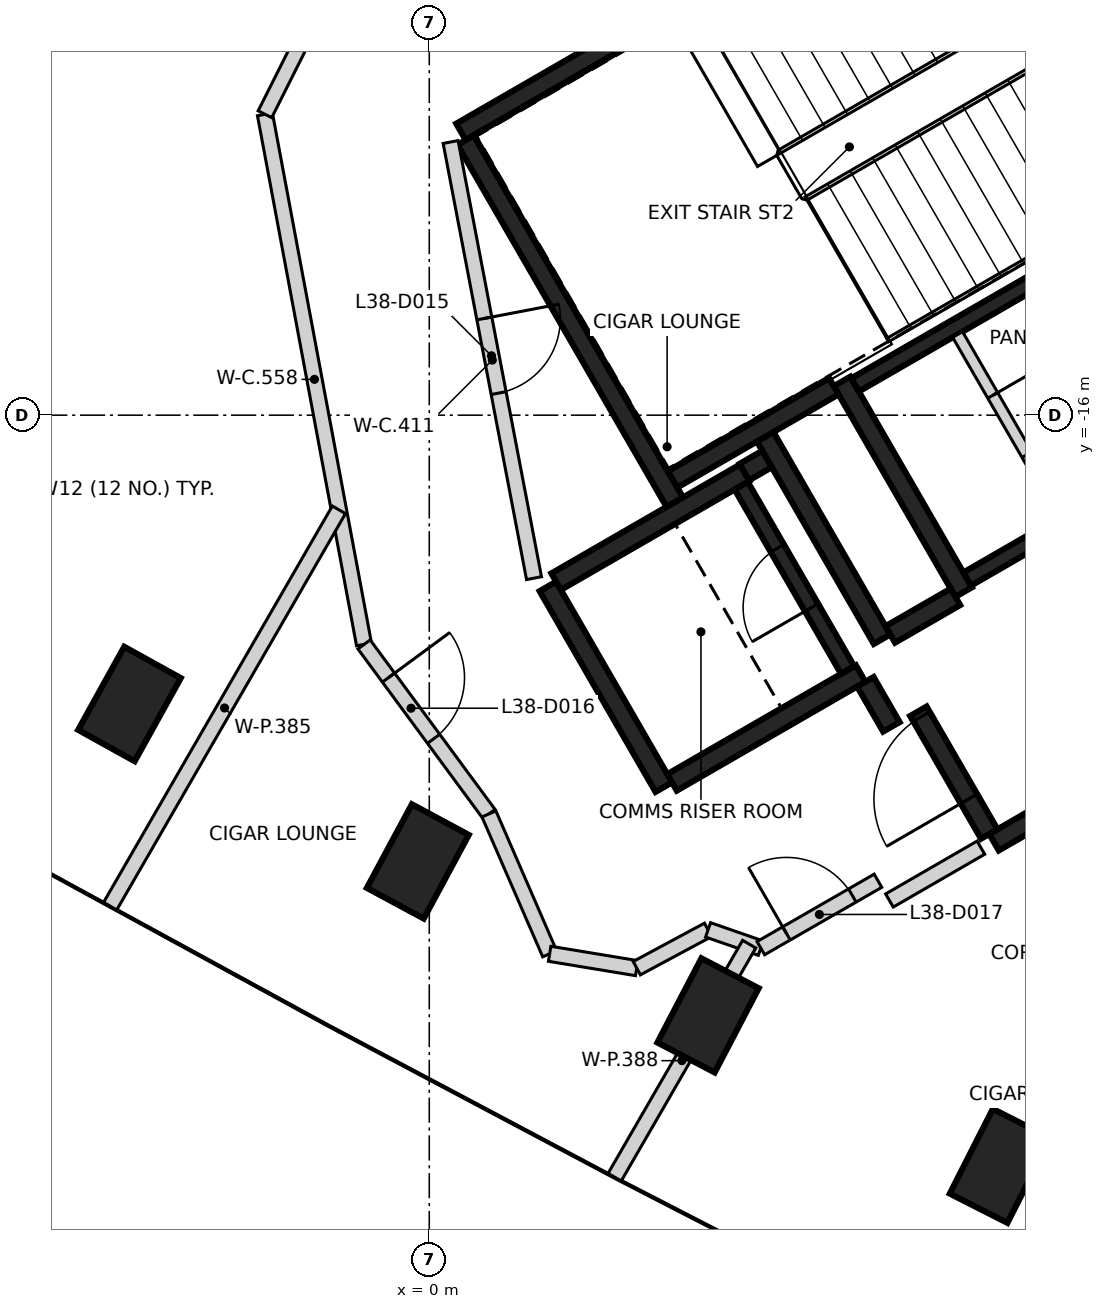
"""IFC4 building model, lengths in metres.
Left out: names, types, materials, properties, quantities, classifications, styles, units other than length and angle.
Written with IfcOpenShell. Run it as: python <this file> out.ifc"""

import sys

from ifc_helpers import new_model, si_unit, direction, frame, frame_2d, origin, origin_2d, place, context, subcontext, project, spatial, rectangle, extrude, element, fill, save


model = new_model("IFC4")
c1 = context("Model", 3, precision=1e-05, world=origin(), true_north=direction((0.0, 1.0)))
c2 = subcontext(c1, "Body", "Model", "MODEL_VIEW")
j1 = project(units=[si_unit("LENGTHUNIT", "METRE"), si_unit("PLANEANGLEUNIT", "RADIAN")], contexts=[c1])
p1 = place(None, origin())
s1 = spatial("IfcSite", under=j1, at=p1, CompositionType="ELEMENT")
p2 = place(p1, origin())
s2 = spatial("IfcBuilding", under=s1, at=p2, CompositionType="ELEMENT")
p3 = place(p2, frame((0.0, 0.0, 154.0)))
s3 = spatial("IfcBuildingStorey", under=s2, at=p3, CompositionType="ELEMENT", Elevation=154.0)
for number, where, z_axis, x_axis in (
    (1, (-3.945, -19.8, -0.4), (0.0, 0.0, 1.0), (0.485, 0.875, 0.0)),
    (2, (-0.151, -21.871, -0.4), (0.0, 0.0, 1.0), (0.474, 0.881, 0.0)),
    (3, (3.667, -23.896, -0.4), (0.0, 0.0, 1.0), (0.463, 0.886, 0.0)),
    (4, (7.51, -25.876, -0.4), (0.0, 0.0, 1.0), (0.453, 0.892, 0.0)),
):
    element("IfcColumn", number, at=place(p3, frame(where, z_axis=z_axis, x_axis=x_axis)), inside=s3, PredefinedType="COLUMN", context=c2, shape_type="SweptSolid", body=[
        extrude(rectangle(XDim=1.25, YDim=0.85, at=origin_2d()), origin(), (0.0, 0.0, 1.0), 3.6),
    ])
p4 = place(p3, frame((0.417, -12.273, 0.0), z_axis=(0.0, 0.0, 1.0), x_axis=(0.866021906294, 0.500006057782, 0.0)))
e5 = element("IfcWall", 5, at=p4, inside=s3, PredefinedType="SHEAR", context=c2, shape_type="SweptSolid", body=[
    extrude(rectangle(XDim=11.55, YDim=0.25, at=frame_2d((5.775, 0.0))), origin(), (0.0, 0.0, 1.0), 3.2),
])
p5 = place(p4, frame((10.025, 0.0, 0.0)))
e6 = element("IfcOpeningElement", 6, at=p5, cuts=e5, PredefinedType="OPENING", context=c2, shape_type="SweptSolid", body=[
    extrude(rectangle(XDim=1.2, YDim=2.1, at=frame_2d((0.6, 1.05))), frame((0.0, 0.135, 0.0), z_axis=(0.0, -1.0, 0.0), x_axis=(1.0, 0.0, 0.0)), (0.0, 0.0, 1.0), 0.27),
])
p6 = place(p4, frame((8.725, 0.0, 0.0)))
e7 = element("IfcOpeningElement", 7, at=p6, cuts=e5, PredefinedType="OPENING", context=c2, shape_type="SweptSolid", body=[
    extrude(rectangle(XDim=1.2, YDim=2.1, at=frame_2d((0.6, 1.05))), frame((0.0, 0.135, 0.0), z_axis=(0.0, -1.0, 0.0), x_axis=(1.0, 0.0, 0.0)), (0.0, 0.0, 1.0), 0.27),
])
p7 = place(p3, frame((3.235, -17.153, 0.0), z_axis=(0.0, 0.0, 1.0), x_axis=(-0.500008851346, 0.866020293397, 0.0)))
e8 = element("IfcWall", 8, at=p7, inside=s3, PredefinedType="SHEAR", context=c2, shape_type="SweptSolid", body=[
    extrude(rectangle(XDim=5.51, YDim=0.25, at=frame_2d((2.755, 0.0))), origin(), (0.0, 0.0, 1.0), 3.2),
])
p8 = place(p3, frame((7.031, -18.327, 0.0), z_axis=(0.0, 0.0, 1.0), x_axis=(-0.499971222258, 0.866042017984, 0.0)))
e9 = element("IfcWall", 9, at=p8, inside=s3, PredefinedType="SHEAR", context=c2, shape_type="SweptSolid", body=[
    extrude(rectangle(XDim=3.2, YDim=0.25, at=frame_2d((1.6, 0.0))), origin(), (0.0, 0.0, 1.0), 3.2),
])
p9 = place(p3, frame((3.085, -20.894, 0.0), z_axis=(0.0, 0.0, 1.0), x_axis=(-0.499978833458, 0.866037623948, 0.0)))
e10 = element("IfcWall", 10, at=p9, inside=s3, PredefinedType="SHEAR", context=c2, shape_type="SweptSolid", body=[
    extrude(rectangle(XDim=3.05, YDim=0.25, at=frame_2d((1.525, 0.0))), origin(), (0.0, 0.0, 1.0), 3.2),
])
p10 = place(p3, frame((1.669, -18.19, 0.0), z_axis=(0.0, 0.0, 1.0), x_axis=(0.866042235819, 0.499970844928, 0.0)))
e11 = element("IfcWall", 11, at=p10, inside=s3, PredefinedType="SHEAR", context=c2, shape_type="SweptSolid", body=[
    extrude(rectangle(XDim=2.865, YDim=0.25, at=frame_2d((1.432, 0.0))), origin(), (0.0, 0.0, 1.0), 3.2),
])
p11 = place(p3, frame((5.675, -19.399, 0.0), z_axis=(0.0, 0.0, 1.0), x_axis=(-0.866026637627, -0.499997862916, 0.0)))
e12 = element("IfcWall", 12, at=p11, inside=s3, PredefinedType="SHEAR", context=c2, shape_type="SweptSolid", body=[
    extrude(rectangle(XDim=2.865, YDim=0.25, at=frame_2d((1.432, 0.0))), origin(), (0.0, 0.0, 1.0), 3.2),
])
p12 = place(p3, frame((4.414, -16.276, 0.0), z_axis=(0.0, 0.0, 1.0), x_axis=(0.500003324108, -0.866023484601, 0.0)))
e13 = element("IfcWall", 13, at=p12, inside=s3, PredefinedType="SHEAR", context=c2, shape_type="SweptSolid", body=[
    extrude(rectangle(XDim=3.085, YDim=0.25, at=frame_2d((1.542, 0.0))), origin(), (0.0, 0.0, 1.0), 3.2),
])
p13 = place(p3, frame((5.322, -15.619, 0.0), z_axis=(0.0, 0.0, 1.0), x_axis=(-0.866026229868, -0.499998569178, 0.0)))
e14 = element("IfcWall", 14, at=p13, inside=s3, PredefinedType="SHEAR", context=c2, shape_type="SweptSolid", body=[
    extrude(rectangle(XDim=2.449, YDim=0.25, at=frame_2d((1.225, 0.0))), origin(), (0.0, 0.0, 1.0), 3.2),
])
p14 = place(p3, frame((9.14, -20.631, 0.0), z_axis=(0.0, 0.0, 1.0), x_axis=(-0.866043531843, -0.499968599967, 0.0)))
e15 = element("IfcWall", 15, at=p14, inside=s3, PredefinedType="SHEAR", context=c2, shape_type="SweptSolid", body=[
    extrude(rectangle(XDim=1.975, YDim=0.25, at=frame_2d((0.987, 0.0))), origin(), (0.0, 0.0, 1.0), 3.2),
])
p15 = place(p3, frame((7.367, -21.51, 0.0), z_axis=(0.0, 0.0, 1.0), x_axis=(-0.499983108224, 0.866035156036, 0.0)))
e16 = element("IfcWall", 16, at=p15, inside=s3, PredefinedType="SHEAR", context=c2, shape_type="SweptSolid", body=[
    extrude(rectangle(XDim=1.865, YDim=0.25, at=frame_2d((0.932, 0.0))), origin(), (0.0, 0.0, 1.0), 3.2),
])
p16 = place(p15, frame((0.535, 0.0, 0.0)))
e17 = element("IfcOpeningElement", 17, at=p16, cuts=e16, PredefinedType="OPENING", context=c2, shape_type="SweptSolid", body=[
    extrude(rectangle(XDim=1.25, YDim=2.1, at=frame_2d((0.625, 1.05))), frame((0.0, 0.135, 0.0), z_axis=(0.0, -1.0, 0.0), x_axis=(1.0, 0.0, 0.0)), (0.0, 0.0, 1.0), 0.27),
])
p17 = place(p3, frame((6.065, -18.885, 0.0), z_axis=(0.0, 0.0, 1.0), x_axis=(0.866017078145, 0.500014420154, 0.0)))
e18 = element("IfcWall", 18, at=p17, inside=s3, PredefinedType="SHEAR", context=c2, shape_type="SweptSolid", body=[
    extrude(rectangle(XDim=0.989, YDim=0.25, at=frame_2d((0.495, 0.0))), origin(), (0.0, 0.0, 1.0), 3.2),
])
p18 = place(p3, frame((6.08, -20.1, 0.0), z_axis=(0.0, 0.0, 1.0), x_axis=(-0.500051773299, 0.865995510393, 0.0)))
e19 = element("IfcWall", 19, at=p18, inside=s3, PredefinedType="SHEAR", context=c2, shape_type="SweptSolid", body=[
    extrude(rectangle(XDim=0.685, YDim=0.25, at=frame_2d((0.342, 0.0))), origin(), (0.0, 0.0, 1.0), 3.2),
])
p19 = place(p3, frame((4.145, -16.749, 0.0), z_axis=(0.0, 0.0, 1.0), x_axis=(0.866185586049, 0.49972245349, 0.0)))
e20 = element("IfcWall", 20, at=p19, inside=s3, PredefinedType="SHEAR", context=c2, shape_type="SweptSolid", body=[
    extrude(rectangle(XDim=0.344, YDim=0.25, at=frame_2d((0.172, 0.0))), origin(), (0.0, 0.0, 1.0), 3.2),
])
p20 = place(p3, frame((10.538, -12.752, 0.0), z_axis=(0.0, 0.0, 1.0), x_axis=(-0.866038630372, -0.499977090179, 0.0)))
e21 = element("IfcWall", 21, at=p20, inside=s3, PredefinedType="SHEAR", context=c2, shape_type="SweptSolid", body=[
    extrude(rectangle(XDim=5.699, YDim=0.2, at=frame_2d((2.85, 0.0))), origin(), (0.0, 0.0, 1.0), 3.2),
])
p21 = place(p3, frame((7.077, -18.156, 0.0), z_axis=(0.0, 0.0, 1.0), x_axis=(0.866038630372, 0.499977090179, 0.0)))
e22 = element("IfcWall", 22, at=p21, inside=s3, PredefinedType="SHEAR", context=c2, shape_type="SweptSolid", body=[
    extrude(rectangle(XDim=5.699, YDim=0.2, at=frame_2d((2.85, 0.0))), origin(), (0.0, 0.0, 1.0), 3.2),
])
p22 = place(p21, frame((3.224, 0.0, 0.0)))
e23 = element("IfcOpeningElement", 23, at=p22, cuts=e22, PredefinedType="OPENING", context=c2, shape_type="SweptSolid", body=[
    extrude(rectangle(XDim=0.9, YDim=2.1, at=frame_2d((0.45, 1.05))), frame((0.0, 0.11, 0.0), z_axis=(0.0, -1.0, 0.0), x_axis=(1.0, 0.0, 0.0)), (0.0, 0.0, 1.0), 0.22),
])
p23 = place(p21, frame((4.599, 0.0, 0.0)))
e24 = element("IfcOpeningElement", 24, at=p23, cuts=e22, PredefinedType="OPENING", context=c2, shape_type="SweptSolid", body=[
    extrude(rectangle(XDim=0.9, YDim=2.1, at=frame_2d((0.45, 1.05))), frame((0.0, 0.11, 0.0), z_axis=(0.0, -1.0, 0.0), x_axis=(1.0, 0.0, 0.0)), (0.0, 0.0, 1.0), 0.22),
])
p24 = place(p3, frame((7.906, -8.094, 0.0), z_axis=(0.0, 0.0, 1.0), x_axis=(0.500024287448, -0.866011380966, 0.0)))
e25 = element("IfcWall", 25, at=p24, inside=s3, PredefinedType="SHEAR", context=c2, shape_type="SweptSolid", body=[
    extrude(rectangle(XDim=5.251, YDim=0.2, at=frame_2d((2.625, 0.0))), origin(), (0.0, 0.0, 1.0), 3.2),
])
p25 = place(p24, frame((1.849, 0.0, 0.0)))
e26 = element("IfcOpeningElement", 26, at=p25, cuts=e25, PredefinedType="OPENING", context=c2, shape_type="SweptSolid", body=[
    extrude(rectangle(XDim=1.4, YDim=2.1, at=frame_2d((0.7, 1.05))), frame((0.0, 0.11, 0.0), z_axis=(0.0, -1.0, 0.0), x_axis=(1.0, 0.0, 0.0)), (0.0, 0.0, 1.0), 0.22),
])
p26 = place(p3, frame((5.503, -19.352, 0.0), z_axis=(0.0, 0.0, 1.0), x_axis=(-0.499986818241, 0.866033014143, 0.0)))
e27 = element("IfcWall", 27, at=p26, inside=s3, PredefinedType="SHEAR", context=c2, shape_type="SweptSolid", body=[
    extrude(rectangle(XDim=2.798, YDim=0.2, at=frame_2d((1.399, 0.0))), origin(), (0.0, 0.0, 1.0), 3.2),
])
p27 = place(p26, frame((0.949, 0.0, 0.0)))
e28 = element("IfcOpeningElement", 28, at=p27, cuts=e27, PredefinedType="OPENING", context=c2, shape_type="SweptSolid", body=[
    extrude(rectangle(XDim=0.9, YDim=2.1, at=frame_2d((0.45, 1.05))), frame((0.0, 0.11, 0.0), z_axis=(0.0, -1.0, 0.0), x_axis=(1.0, 0.0, 0.0)), (0.0, 0.0, 1.0), 0.22),
])
p28 = place(p3, frame((6.951, -14.939, 0.0), z_axis=(0.0, 0.0, 1.0), x_axis=(0.499988999718, -0.866031754707, 0.0)))
e29 = element("IfcWall", 29, at=p28, inside=s3, PredefinedType="PARTITIONING", context=c2, shape_type="SweptSolid", body=[
    extrude(rectangle(XDim=2.749, YDim=0.15, at=frame_2d((1.374, 0.0))), origin(), (0.0, 0.0, 1.0), 3.2),
])
p29 = place(p28, frame((0.924, 0.0, 0.0)))
e30 = element("IfcOpeningElement", 30, at=p29, cuts=e29, PredefinedType="OPENING", context=c2, shape_type="SweptSolid", body=[
    extrude(rectangle(XDim=0.9, YDim=2.1, at=frame_2d((0.45, 1.05))), frame((0.0, 0.085, 0.0), z_axis=(0.0, -1.0, 0.0), x_axis=(1.0, 0.0, 0.0)), (0.0, 0.0, 1.0), 0.17),
])
p30 = place(p3, frame((-2.162, -12.042, 0.0), z_axis=(0.0, 0.0, 1.0), x_axis=(0.18377734651, -0.982967897192, 0.0)))
e31 = element("IfcWall", 31, at=p30, inside=s3, PredefinedType="PARTITIONING", context=c2, shape_type="SweptSolid", body=[
    extrude(rectangle(XDim=7.094, YDim=0.2, at=frame_2d((3.547, 0.0))), origin(), (0.0, 0.0, 1.0), 3.2),
])
p31 = place(p3, frame((-2.162, -12.041, 0.0), z_axis=(0.0, 0.0, 1.0), x_axis=(0.448937335771, 0.893563242614, 0.0)))
e32 = element("IfcWall", 32, at=p31, inside=s3, PredefinedType="PARTITIONING", context=c2, shape_type="SweptSolid", body=[
    extrude(rectangle(XDim=3.115, YDim=0.2, at=frame_2d((1.557, 0.0))), origin(), (0.0, 0.0, 1.0), 3.2),
])
p32 = place(p3, frame((-0.858, -19.016, 0.0), z_axis=(0.0, 0.0, 1.0), x_axis=(0.593123867414, -0.805111220829, 0.0)))
e33 = element("IfcWall", 33, at=p32, inside=s3, PredefinedType="PARTITIONING", context=c2, shape_type="SweptSolid", body=[
    extrude(rectangle(XDim=2.77, YDim=0.2, at=frame_2d((1.385, 0.0))), origin(), (0.0, 0.0, 1.0), 3.2),
])
p33 = place(p32, frame((0.542, 0.0, 0.0)))
e34 = element("IfcOpeningElement", 34, at=p33, cuts=e33, PredefinedType="OPENING", context=c2, shape_type="SweptSolid", body=[
    extrude(rectangle(XDim=1.0, YDim=2.1, at=frame_2d((0.5, 1.05))), frame((0.0, 0.11, 0.0), z_axis=(0.0, -1.0, 0.0), x_axis=(1.0, 0.0, 0.0)), (0.0, 0.0, 1.0), 0.22),
])
p34 = place(p3, frame((0.281, -12.406, 0.0), z_axis=(0.0, 0.0, 1.0), x_axis=(0.187814940093, -0.982204433037, 0.0)))
e35 = element("IfcWall", 35, at=p34, inside=s3, PredefinedType="PARTITIONING", context=c2, shape_type="SweptSolid", body=[
    extrude(rectangle(XDim=5.842, YDim=0.2, at=frame_2d((2.921, 0.0))), origin(), (0.0, 0.0, 1.0), 3.2),
])
p35 = place(p34, frame((2.363, 0.0, 0.0)))
e36 = element("IfcOpeningElement", 36, at=p35, cuts=e35, PredefinedType="OPENING", context=c2, shape_type="SweptSolid", body=[
    extrude(rectangle(XDim=1.0, YDim=2.1, at=frame_2d((0.5, 1.05))), frame((0.0, 0.11, 0.0), z_axis=(0.0, -1.0, 0.0), x_axis=(1.0, 0.0, 0.0)), (0.0, 0.0, 1.0), 0.22),
])
p36 = place(p3, frame((0.785, -21.246, 0.0), z_axis=(0.0, 0.0, 1.0), x_axis=(0.398365586627, -0.917226721913, 0.0)))
e37 = element("IfcWall", 37, at=p36, inside=s3, PredefinedType="PARTITIONING", context=c2, shape_type="SweptSolid", body=[
    extrude(rectangle(XDim=2.006, YDim=0.2, at=frame_2d((1.003, 0.0))), origin(), (0.0, 0.0, 1.0), 2.3),
])
p37 = place(p3, frame((1.584, -23.086, 0.0), z_axis=(0.0, 0.0, 1.0), x_axis=(0.986654221629, -0.162829502674, 0.0)))
e38 = element("IfcWall", 38, at=p37, inside=s3, PredefinedType="PARTITIONING", context=c2, shape_type="SweptSolid", body=[
    extrude(rectangle(XDim=1.16, YDim=0.2, at=frame_2d((0.58, 0.0))), origin(), (0.0, 0.0, 1.0), 2.3),
])
p38 = place(p3, frame((2.73, -23.275, 0.0), z_axis=(0.0, 0.0, 1.0), x_axis=(0.880927165636, 0.473251866182, 0.0)))
e39 = element("IfcWall", 39, at=p38, inside=s3, PredefinedType="PARTITIONING", context=c2, shape_type="SweptSolid", body=[
    extrude(rectangle(XDim=1.065, YDim=0.2, at=frame_2d((0.532, 0.0))), origin(), (0.0, 0.0, 1.0), 3.2),
])
p39 = place(p3, frame((3.668, -22.771, 0.0), z_axis=(0.0, 0.0, 1.0), x_axis=(0.944447470761, -0.328662402738, 0.0)))
e40 = element("IfcWall", 40, at=p39, inside=s3, PredefinedType="PARTITIONING", context=c2, shape_type="SweptSolid", body=[
    extrude(rectangle(XDim=0.735, YDim=0.2, at=frame_2d((0.367, 0.0))), origin(), (0.0, 0.0, 1.0), 3.2),
])
p40 = place(p3, frame((4.362, -23.012, 0.0), z_axis=(0.0, 0.0, 1.0), x_axis=(0.866692617793, 0.49884256661, 0.0)))
e41 = element("IfcWall", 41, at=p40, inside=s3, PredefinedType="PARTITIONING", context=c2, shape_type="SweptSolid", body=[
    extrude(rectangle(XDim=1.778, YDim=0.2, at=frame_2d((0.889, 0.0))), origin(), (0.0, 0.0, 1.0), 3.2),
])
p41 = place(p40, frame((0.389, 0.0, 0.0)))
e42 = element("IfcOpeningElement", 42, at=p41, cuts=e41, PredefinedType="OPENING", context=c2, shape_type="SweptSolid", body=[
    extrude(rectangle(XDim=1.0, YDim=2.1, at=frame_2d((0.5, 1.05))), frame((0.0, 0.11, 0.0), z_axis=(0.0, -1.0, 0.0), x_axis=(1.0, 0.0, 0.0)), (0.0, 0.0, 1.0), 0.22),
])
p42 = place(p3, frame((6.054, -22.385, 0.0), z_axis=(0.0, 0.0, 1.0), x_axis=(0.86593101922, 0.500163443238, 0.0)))
e43 = element("IfcWall", 43, at=p42, inside=s3, PredefinedType="PARTITIONING", context=c2, shape_type="SweptSolid", body=[
    extrude(rectangle(XDim=1.39, YDim=0.2, at=frame_2d((0.695, 0.0))), origin(), (0.0, 0.0, 1.0), 3.2),
])
p43 = place(p3, frame((-4.198, -22.459, 0.0), z_axis=(0.0, 0.0, 1.0), x_axis=(0.499899163109, 0.866083614164, 0.0)))
e44 = element("IfcWall", 44, at=p43, inside=s3, PredefinedType="PARTITIONING", context=c2, shape_type="SweptSolid", body=[
    extrude(rectangle(XDim=6.02, YDim=0.2, at=frame_2d((3.01, 0.0))), origin(), (0.0, 0.0, 1.0), 2.3),
])
p44 = place(p3, frame((2.439, -26.024, 0.0), z_axis=(0.0, 0.0, 1.0), x_axis=(0.499989137667, 0.866031675065, 0.0)))
e45 = element("IfcWall", 45, at=p44, inside=s3, PredefinedType="PARTITIONING", context=c2, shape_type="SweptSolid", body=[
    extrude(rectangle(XDim=3.54, YDim=0.2, at=frame_2d((1.77, 0.0))), origin(), (0.0, 0.0, 1.0), 3.2),
])
p45 = place(p16, origin())
e46 = element("IfcDoor", 46, at=p45, inside=s3, OperationType="SINGLE_SWING_LEFT", PredefinedType="DOOR", context=c2, shape_type="SweptSolid", body=[
    extrude(rectangle(XDim=1.25, YDim=2.1, at=frame_2d((0.625, 1.05))), frame((0.0, 0.025, 0.0), z_axis=(0.0, -1.0, 0.0), x_axis=(1.0, 0.0, 0.0)), (0.0, 0.0, 1.0), 0.05),
])
fill(e17, e46)
p46 = place(p27, origin())
e47 = element("IfcDoor", 47, at=p46, inside=s3, OperationType="SINGLE_SWING_RIGHT", PredefinedType="DOOR", context=c2, shape_type="SweptSolid", body=[
    extrude(rectangle(XDim=0.9, YDim=2.1, at=frame_2d((0.45, 1.05))), frame((0.0, 0.025, 0.0), z_axis=(0.0, -1.0, 0.0), x_axis=(1.0, 0.0, 0.0)), (0.0, 0.0, 1.0), 0.05),
])
fill(e28, e47)
p47 = place(p29, origin())
e48 = element("IfcDoor", 48, at=p47, inside=s3, OperationType="SINGLE_SWING_RIGHT", PredefinedType="DOOR", context=c2, shape_type="SweptSolid", body=[
    extrude(rectangle(XDim=0.9, YDim=2.1, at=frame_2d((0.45, 1.05))), frame((0.0, 0.025, 0.0), z_axis=(0.0, -1.0, 0.0), x_axis=(1.0, 0.0, 0.0)), (0.0, 0.0, 1.0), 0.05),
])
fill(e30, e48)
p48 = place(p35, origin())
e49 = element("IfcDoor", 49, at=p48, inside=s3, OperationType="SINGLE_SWING_LEFT", PredefinedType="DOOR", context=c2, shape_type="SweptSolid", body=[
    extrude(rectangle(XDim=1.0, YDim=2.1, at=frame_2d((0.5, 1.05))), frame((0.0, 0.025, 0.0), z_axis=(0.0, -1.0, 0.0), x_axis=(1.0, 0.0, 0.0)), (0.0, 0.0, 1.0), 0.05),
])
fill(e36, e49)
p49 = place(p33, frame((1.0, 0.0, 0.0), z_axis=(0.0, 0.0, 1.0), x_axis=(-1.0, 0.0, 0.0)))
e50 = element("IfcDoor", 50, at=p49, inside=s3, OperationType="SINGLE_SWING_LEFT", PredefinedType="DOOR", context=c2, shape_type="SweptSolid", body=[
    extrude(rectangle(XDim=1.0, YDim=2.1, at=frame_2d((0.5, 1.05))), frame((0.0, 0.025, 0.0), z_axis=(0.0, -1.0, 0.0), x_axis=(1.0, 0.0, 0.0)), (0.0, 0.0, 1.0), 0.05),
])
fill(e34, e50)
p50 = place(p41, frame((1.0, 0.0, 0.0), z_axis=(0.0, 0.0, 1.0), x_axis=(-1.0, 0.0, 0.0)))
e51 = element("IfcDoor", 51, at=p50, inside=s3, OperationType="SINGLE_SWING_LEFT", PredefinedType="DOOR", context=c2, shape_type="SweptSolid", body=[
    extrude(rectangle(XDim=1.0, YDim=2.1, at=frame_2d((0.5, 1.05))), frame((0.0, 0.025, 0.0), z_axis=(0.0, -1.0, 0.0), x_axis=(1.0, 0.0, 0.0)), (0.0, 0.0, 1.0), 0.05),
])
fill(e42, e51)
save(model, sys.argv[1])
